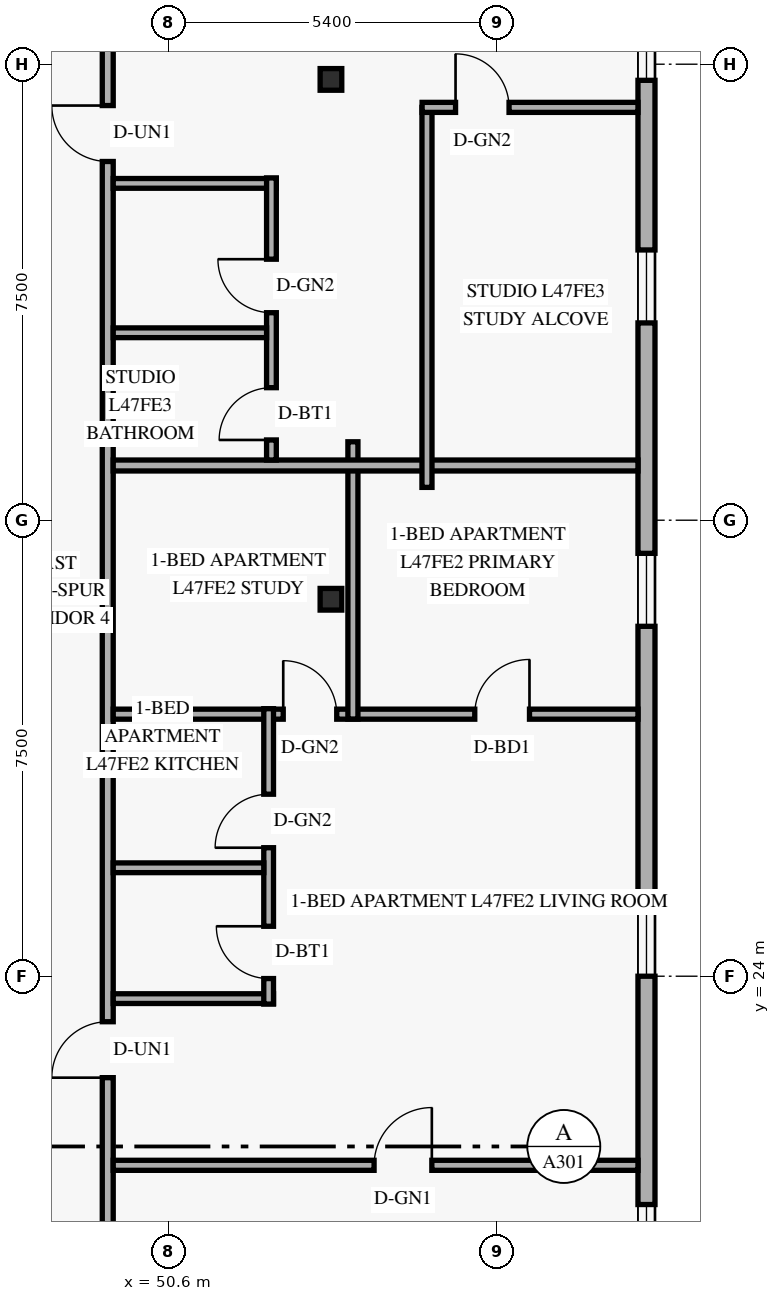
"""IFC4 building model, lengths in metres.
Left out: names, types, materials, properties, quantities, classifications, styles, units other than length and angle.
Written with IfcOpenShell. Run it as: python <this file> out.ifc"""

import sys

from ifc_helpers import new_model, si_unit, direction, frame, frame_2d, origin, origin_2d, place, context, subcontext, project, spatial, rectangle, hollow_rectangle, extrude, element, fill, save


model = new_model("IFC4")
c1 = context("Model", 3, precision=1e-05, world=origin(), true_north=direction((0.0, 1.0)))
c2 = subcontext(c1, "Body", "Model", "MODEL_VIEW")
j1 = project(units=[si_unit("LENGTHUNIT", "METRE"), si_unit("PLANEANGLEUNIT", "RADIAN")], contexts=[c1])
p1 = place(None, origin())
s1 = spatial("IfcSite", under=j1, at=p1, CompositionType="ELEMENT")
p2 = place(p1, origin())
s2 = spatial("IfcBuilding", under=s1, at=p2, CompositionType="ELEMENT")
p3 = place(p2, frame((0.0, 0.0, 181.2)))
s3 = spatial("IfcBuildingStorey", under=s2, at=p3, CompositionType="ELEMENT", Elevation=181.2)
for number, where, z_axis, x_axis in (
    (1, (53.167, 30.2, 0.0), (0.058, 0.0, 0.998), (0.0, 1.0, 0.0)),
    (2, (53.167, 38.75, 0.0), (0.058, 0.0, 0.998), (0.0, 1.0, 0.0)),
):
    element("IfcColumn", number, at=place(p3, frame(where, z_axis=z_axis, x_axis=x_axis)), inside=s3, PredefinedType="COLUMN", context=c2, shape_type="SweptSolid", body=[
        extrude(hollow_rectangle(XDim=0.356, YDim=0.356, WallThickness=0.016, at=origin_2d()), origin(), (0.0, 0.0, 1.0), 3.606),
    ])
p4 = place(p3, frame((58.46, 7.62, 0.0), z_axis=(0.0, 0.0, 1.0), x_axis=(0.0, 1.0, 0.0)))
e3 = element("IfcWall", 3, at=p4, inside=s3, PredefinedType="SOLIDWALL", context=c2, shape_type="SweptSolid", body=[
    extrude(rectangle(XDim=32.76, YDim=0.28, at=frame_2d((16.38, 0.0))), origin(), (0.0, 0.0, 1.0), 3.36),
])
p5 = place(p4, frame((4.79, 0.0, 0.85)))
e4 = element("IfcOpeningElement", 4, at=p5, cuts=e3, PredefinedType="OPENING", context=c2, shape_type="SweptSolid", body=[
    extrude(rectangle(XDim=1.2, YDim=1.5, at=frame_2d((0.6, 0.75))), frame((0.0, 0.15, 0.0), z_axis=(0.0, -1.0, 0.0), x_axis=(1.0, 0.0, 0.0)), (0.0, 0.0, 1.0), 0.3),
])
p6 = place(p4, frame((11.425, 0.0, 0.85)))
e5 = element("IfcOpeningElement", 5, at=p6, cuts=e3, PredefinedType="OPENING", context=c2, shape_type="SweptSolid", body=[
    extrude(rectangle(XDim=1.2, YDim=1.5, at=frame_2d((0.6, 0.75))), frame((0.0, 0.15, 0.0), z_axis=(0.0, -1.0, 0.0), x_axis=(1.0, 0.0, 0.0)), (0.0, 0.0, 1.0), 0.3),
])
p7 = place(p4, frame((16.38, 0.0, 0.85)))
e6 = element("IfcOpeningElement", 6, at=p7, cuts=e3, PredefinedType="OPENING", context=c2, shape_type="SweptSolid", body=[
    extrude(rectangle(XDim=1.2, YDim=1.5, at=frame_2d((0.6, 0.75))), frame((0.0, 0.15, 0.0), z_axis=(0.0, -1.0, 0.0), x_axis=(1.0, 0.0, 0.0)), (0.0, 0.0, 1.0), 0.3),
])
p8 = place(p4, frame((22.135, 0.0, 0.85)))
e7 = element("IfcOpeningElement", 7, at=p8, cuts=e3, PredefinedType="OPENING", context=c2, shape_type="SweptSolid", body=[
    extrude(rectangle(XDim=1.2, YDim=1.5, at=frame_2d((0.6, 0.75))), frame((0.0, 0.15, 0.0), z_axis=(0.0, -1.0, 0.0), x_axis=(1.0, 0.0, 0.0)), (0.0, 0.0, 1.0), 0.3),
])
p9 = place(p4, frame((27.125, 0.0, 0.85)))
e8 = element("IfcOpeningElement", 8, at=p9, cuts=e3, PredefinedType="OPENING", context=c2, shape_type="SweptSolid", body=[
    extrude(rectangle(XDim=1.2, YDim=1.5, at=frame_2d((0.6, 0.75))), frame((0.0, 0.15, 0.0), z_axis=(0.0, -1.0, 0.0), x_axis=(1.0, 0.0, 0.0)), (0.0, 0.0, 1.0), 0.3),
])
p10 = place(p4, frame((31.115, 0.0, 0.85)))
e9 = element("IfcOpeningElement", 9, at=p10, cuts=e3, PredefinedType="OPENING", context=c2, shape_type="SweptSolid", body=[
    extrude(rectangle(XDim=1.2, YDim=1.5, at=frame_2d((0.6, 0.75))), frame((0.0, 0.15, 0.0), z_axis=(0.0, -1.0, 0.0), x_axis=(1.0, 0.0, 0.0)), (0.0, 0.0, 1.0), 0.3),
])
p11 = place(p3, frame((49.6, 4.28, 0.0), z_axis=(0.0, 0.0, 1.0), x_axis=(0.0, 1.0, 0.0)))
e10 = element("IfcWall", 10, at=p11, inside=s3, PredefinedType="STANDARD", context=c2, shape_type="SweptSolid", body=[
    extrude(rectangle(XDim=39.44, YDim=0.18, at=frame_2d((19.72, 0.0))), origin(), (0.0, 0.0, 1.0), 2.73),
])
p12 = place(p11, frame((8.52, 0.0, 0.0)))
e11 = element("IfcOpeningElement", 11, at=p12, cuts=e10, PredefinedType="OPENING", context=c2, shape_type="SweptSolid", body=[
    extrude(rectangle(XDim=0.92, YDim=2.15, at=frame_2d((0.46, 1.075))), frame((0.0, 0.1, 0.0), z_axis=(0.0, -1.0, 0.0), x_axis=(1.0, 0.0, 0.0)), (0.0, 0.0, 1.0), 0.2),
])
p13 = place(p11, frame((18.052, 0.0, 0.0)))
e12 = element("IfcOpeningElement", 12, at=p13, cuts=e10, PredefinedType="OPENING", context=c2, shape_type="SweptSolid", body=[
    extrude(rectangle(XDim=0.92, YDim=2.15, at=frame_2d((0.46, 1.075))), frame((0.0, 0.1, 0.0), z_axis=(0.0, -1.0, 0.0), x_axis=(1.0, 0.0, 0.0)), (0.0, 0.0, 1.0), 0.2),
])
p14 = place(p11, frame((33.12, 0.0, 0.0)))
e13 = element("IfcOpeningElement", 13, at=p14, cuts=e10, PredefinedType="OPENING", context=c2, shape_type="SweptSolid", body=[
    extrude(rectangle(XDim=0.92, YDim=2.15, at=frame_2d((0.46, 1.075))), frame((0.0, 0.1, 0.0), z_axis=(0.0, -1.0, 0.0), x_axis=(1.0, 0.0, 0.0)), (0.0, 0.0, 1.0), 0.2),
])
p15 = place(p3, frame((49.69, 28.31, 0.0), z_axis=(0.0, 0.0, 1.0), x_axis=(1.0, 0.0, 0.0)))
e14 = element("IfcWall", 14, at=p15, inside=s3, PredefinedType="PARTITIONING", context=c2, shape_type="SweptSolid", body=[
    extrude(rectangle(XDim=8.63, YDim=0.165, at=frame_2d((4.315, 0.0))), origin(), (0.0, 0.0, 1.0), 2.879),
])
p16 = place(p15, frame((2.796, 0.0, 0.0)))
e15 = element("IfcOpeningElement", 15, at=p16, cuts=e14, PredefinedType="OPENING", context=c2, shape_type="SweptSolid", body=[
    extrude(rectangle(XDim=0.88, YDim=2.12, at=frame_2d((0.44, 1.06))), frame((0.0, 0.093, 0.0), z_axis=(0.0, -1.0, 0.0), x_axis=(1.0, 0.0, 0.0)), (0.0, 0.0, 1.0), 0.185),
])
p17 = place(p15, frame((5.946, 0.0, 0.0)))
e16 = element("IfcOpeningElement", 16, at=p17, cuts=e14, PredefinedType="OPENING", context=c2, shape_type="SweptSolid", body=[
    extrude(rectangle(XDim=0.9, YDim=2.14, at=frame_2d((0.45, 1.07))), frame((0.0, 0.093, 0.0), z_axis=(0.0, -1.0, 0.0), x_axis=(1.0, 0.0, 0.0)), (0.0, 0.0, 1.0), 0.185),
])
p18 = place(p3, frame((49.69, 23.632, 0.0), z_axis=(0.0, 0.0, 1.0), x_axis=(1.0, 0.0, 0.0)))
e17 = element("IfcWall", 17, at=p18, inside=s3, PredefinedType="PLUMBINGWALL", context=c2, shape_type="SweptSolid", body=[
    extrude(rectangle(XDim=2.636, YDim=0.16, at=frame_2d((1.318, 0.0))), origin(), (0.0, 0.0, 1.0), 3.36),
])
p19 = place(p3, frame((52.246, 23.542, 0.0), z_axis=(0.0, 0.0, 1.0), x_axis=(0.0, 1.0, 0.0)))
e18 = element("IfcWall", 18, at=p19, inside=s3, PredefinedType="PLUMBINGWALL", context=c2, shape_type="SweptSolid", body=[
    extrude(rectangle(XDim=4.858, YDim=0.16, at=frame_2d((2.429, 0.0))), origin(), (0.0, 0.0, 1.0), 3.36),
])
p20 = place(p19, frame((0.42, 0.0, 0.0)))
e19 = element("IfcOpeningElement", 19, at=p20, cuts=e18, PredefinedType="OPENING", context=c2, shape_type="SweptSolid", body=[
    extrude(rectangle(XDim=0.86, YDim=2.12, at=frame_2d((0.43, 1.06))), frame((0.0, 0.09, 0.0), z_axis=(0.0, -1.0, 0.0), x_axis=(1.0, 0.0, 0.0)), (0.0, 0.0, 1.0), 0.18),
])
p21 = place(p19, frame((2.572, 0.0, 0.0)))
e20 = element("IfcOpeningElement", 20, at=p21, cuts=e18, PredefinedType="OPENING", context=c2, shape_type="SweptSolid", body=[
    extrude(rectangle(XDim=0.88, YDim=2.12, at=frame_2d((0.44, 1.06))), frame((0.0, 0.09, 0.0), z_axis=(0.0, -1.0, 0.0), x_axis=(1.0, 0.0, 0.0)), (0.0, 0.0, 1.0), 0.18),
])
p22 = place(p3, frame((49.69, 25.784, 0.0), z_axis=(0.0, 0.0, 1.0), x_axis=(1.0, 0.0, 0.0)))
e21 = element("IfcWall", 21, at=p22, inside=s3, PredefinedType="PLUMBINGWALL", context=c2, shape_type="SweptSolid", body=[
    extrude(rectangle(XDim=2.476, YDim=0.16, at=frame_2d((1.238, 0.0))), origin(), (0.0, 0.0, 1.0), 3.36),
])
p23 = place(p3, frame((49.69, 20.89, 0.0), z_axis=(0.0, 0.0, 1.0), x_axis=(1.0, 0.0, 0.0)))
e22 = element("IfcWall", 22, at=p23, inside=s3, PredefinedType="PARTITIONING", context=c2, shape_type="SweptSolid", body=[
    extrude(rectangle(XDim=8.63, YDim=0.165, at=frame_2d((4.315, 0.0))), origin(), (0.0, 0.0, 1.0), 2.879),
])
p24 = place(p23, frame((4.29, 0.0, 0.0)))
e23 = element("IfcOpeningElement", 23, at=p24, cuts=e22, PredefinedType="OPENING", context=c2, shape_type="SweptSolid", body=[
    extrude(rectangle(XDim=0.95, YDim=2.15, at=frame_2d((0.475, 1.075))), frame((0.0, 0.093, 0.0), z_axis=(0.0, -1.0, 0.0), x_axis=(1.0, 0.0, 0.0)), (0.0, 0.0, 1.0), 0.185),
])
p25 = place(p3, frame((53.632, 28.23, 0.0), z_axis=(0.0, 0.0, 1.0), x_axis=(0.0, 1.0, 0.0)))
e24 = element("IfcWall", 24, at=p25, inside=s3, PredefinedType="PARTITIONING", context=c2, shape_type="SweptSolid", body=[
    extrude(rectangle(XDim=4.56, YDim=0.165, at=frame_2d((2.28, 0.0))), origin(), (0.0, 0.0, 1.0), 3.36),
])
p26 = place(p3, frame((49.69, 32.4, 0.0), z_axis=(0.0, 0.0, 1.0), x_axis=(1.0, 0.0, 0.0)))
e25 = element("IfcWall", 25, at=p26, inside=s3, PredefinedType="PARTITIONING", context=c2, shape_type="SweptSolid", body=[
    extrude(rectangle(XDim=8.63, YDim=0.18, at=frame_2d((4.315, 0.0))), origin(), (0.0, 0.0, 1.0), 2.879),
])
p27 = place(p3, frame((49.69, 37.04, 0.0), z_axis=(0.0, 0.0, 1.0), x_axis=(1.0, 0.0, 0.0)))
e26 = element("IfcWall", 26, at=p27, inside=s3, PredefinedType="PLUMBINGWALL", context=c2, shape_type="SweptSolid", body=[
    extrude(rectangle(XDim=2.682, YDim=0.16, at=frame_2d((1.341, 0.0))), origin(), (0.0, 0.0, 1.0), 3.36),
])
p28 = place(p3, frame((52.292, 32.49, 0.0), z_axis=(0.0, 0.0, 1.0), x_axis=(0.0, 1.0, 0.0)))
e27 = element("IfcWall", 27, at=p28, inside=s3, PredefinedType="PLUMBINGWALL", context=c2, shape_type="SweptSolid", body=[
    extrude(rectangle(XDim=4.64, YDim=0.16, at=frame_2d((2.32, 0.0))), origin(), (0.0, 0.0, 1.0), 2.984),
])
p29 = place(p28, frame((0.33, 0.0, 0.0)))
e28 = element("IfcOpeningElement", 28, at=p29, cuts=e27, PredefinedType="OPENING", context=c2, shape_type="SweptSolid", body=[
    extrude(rectangle(XDim=0.86, YDim=2.12, at=frame_2d((0.43, 1.06))), frame((0.0, 0.09, 0.0), z_axis=(0.0, -1.0, 0.0), x_axis=(1.0, 0.0, 0.0)), (0.0, 0.0, 1.0), 0.18),
])
p30 = place(p28, frame((2.423, 0.0, 0.0)))
e29 = element("IfcOpeningElement", 29, at=p30, cuts=e27, PredefinedType="OPENING", context=c2, shape_type="SweptSolid", body=[
    extrude(rectangle(XDim=0.88, YDim=2.12, at=frame_2d((0.44, 1.06))), frame((0.0, 0.09, 0.0), z_axis=(0.0, -1.0, 0.0), x_axis=(1.0, 0.0, 0.0)), (0.0, 0.0, 1.0), 0.18),
])
p31 = place(p3, frame((49.69, 34.583, 0.0), z_axis=(0.0, 0.0, 1.0), x_axis=(1.0, 0.0, 0.0)))
e30 = element("IfcWall", 30, at=p31, inside=s3, PredefinedType="PLUMBINGWALL", context=c2, shape_type="SweptSolid", body=[
    extrude(rectangle(XDim=2.522, YDim=0.16, at=frame_2d((1.261, 0.0))), origin(), (0.0, 0.0, 1.0), 2.984),
])
p32 = place(p3, frame((54.85, 32.04, 0.0), z_axis=(0.0, 0.0, 1.0), x_axis=(0.0, 1.0, 0.0)))
e31 = element("IfcWall", 31, at=p32, inside=s3, PredefinedType="PARTITIONING", context=c2, shape_type="SweptSolid", body=[
    extrude(rectangle(XDim=6.25, YDim=0.165, at=frame_2d((3.125, 0.0))), origin(), (0.0, 0.0, 1.0), 3.36),
])
p33 = place(p3, frame((54.77, 38.29, 0.0), z_axis=(0.0, 0.0, 1.0), x_axis=(1.0, 0.0, 0.0)))
e32 = element("IfcWall", 32, at=p33, inside=s3, PredefinedType="PARTITIONING", context=c2, shape_type="SweptSolid", body=[
    extrude(rectangle(XDim=3.55, YDim=0.165, at=frame_2d((1.775, 0.0))), origin(), (0.0, 0.0, 1.0), 3.36),
])
p34 = place(p33, frame((0.55, 0.0, 0.0)))
e33 = element("IfcOpeningElement", 33, at=p34, cuts=e32, PredefinedType="OPENING", context=c2, shape_type="SweptSolid", body=[
    extrude(rectangle(XDim=0.88, YDim=2.12, at=frame_2d((0.44, 1.06))), frame((0.0, 0.093, 0.0), z_axis=(0.0, -1.0, 0.0), x_axis=(1.0, 0.0, 0.0)), (0.0, 0.0, 1.0), 0.185),
])
p35 = place(p6, origin())
e34 = element("IfcWindow", 34, at=p35, inside=s3, PartitioningType="SINGLE_PANEL", PredefinedType="WINDOW", context=c2, shape_type="SweptSolid", body=[
    extrude(rectangle(XDim=1.2, YDim=1.5, at=frame_2d((0.6, 0.75))), frame((0.0, 0.03, 0.0), z_axis=(0.0, -1.0, 0.0), x_axis=(1.0, 0.0, 0.0)), (0.0, 0.0, 1.0), 0.06),
])
fill(e5, e34)
p36 = place(p7, origin())
e35 = element("IfcWindow", 35, at=p36, inside=s3, PartitioningType="SINGLE_PANEL", PredefinedType="WINDOW", context=c2, shape_type="SweptSolid", body=[
    extrude(rectangle(XDim=1.2, YDim=1.5, at=frame_2d((0.6, 0.75))), frame((0.0, 0.03, 0.0), z_axis=(0.0, -1.0, 0.0), x_axis=(1.0, 0.0, 0.0)), (0.0, 0.0, 1.0), 0.06),
])
fill(e6, e35)
p37 = place(p8, origin())
e36 = element("IfcWindow", 36, at=p37, inside=s3, PartitioningType="SINGLE_PANEL", PredefinedType="WINDOW", context=c2, shape_type="SweptSolid", body=[
    extrude(rectangle(XDim=1.2, YDim=1.5, at=frame_2d((0.6, 0.75))), frame((0.0, 0.03, 0.0), z_axis=(0.0, -1.0, 0.0), x_axis=(1.0, 0.0, 0.0)), (0.0, 0.0, 1.0), 0.06),
])
fill(e7, e36)
p38 = place(p9, origin())
e37 = element("IfcWindow", 37, at=p38, inside=s3, PartitioningType="SINGLE_PANEL", PredefinedType="WINDOW", context=c2, shape_type="SweptSolid", body=[
    extrude(rectangle(XDim=1.2, YDim=1.5, at=frame_2d((0.6, 0.75))), frame((0.0, 0.03, 0.0), z_axis=(0.0, -1.0, 0.0), x_axis=(1.0, 0.0, 0.0)), (0.0, 0.0, 1.0), 0.06),
])
fill(e8, e37)
p39 = place(p10, origin())
e38 = element("IfcWindow", 38, at=p39, inside=s3, PartitioningType="SINGLE_PANEL", PredefinedType="WINDOW", context=c2, shape_type="SweptSolid", body=[
    extrude(rectangle(XDim=1.2, YDim=1.5, at=frame_2d((0.6, 0.75))), frame((0.0, 0.03, 0.0), z_axis=(0.0, -1.0, 0.0), x_axis=(1.0, 0.0, 0.0)), (0.0, 0.0, 1.0), 0.06),
])
fill(e9, e38)
p40 = place(p24, origin())
e39 = element("IfcDoor", 39, at=p40, inside=s3, OperationType="SINGLE_SWING_RIGHT", PredefinedType="DOOR", context=c2, shape_type="SweptSolid", body=[
    extrude(rectangle(XDim=0.95, YDim=2.15, at=frame_2d((0.475, 1.075))), frame((0.0, 0.025, 0.0), z_axis=(0.0, -1.0, 0.0), x_axis=(1.0, 0.0, 0.0)), (0.0, 0.0, 1.0), 0.05),
])
fill(e23, e39)
p41 = place(p13, origin())
e40 = element("IfcDoor", 40, at=p41, inside=s3, OperationType="SINGLE_SWING_LEFT", PredefinedType="DOOR", context=c2, shape_type="SweptSolid", body=[
    extrude(rectangle(XDim=0.92, YDim=2.15, at=frame_2d((0.46, 1.075))), frame((0.0, 0.025, 0.0), z_axis=(0.0, -1.0, 0.0), x_axis=(1.0, 0.0, 0.0)), (0.0, 0.0, 1.0), 0.05),
])
fill(e12, e40)
p42 = place(p20, origin())
e41 = element("IfcDoor", 41, at=p42, inside=s3, OperationType="SINGLE_SWING_RIGHT", PredefinedType="DOOR", context=c2, shape_type="SweptSolid", body=[
    extrude(rectangle(XDim=0.86, YDim=2.12, at=frame_2d((0.43, 1.06))), frame((0.0, 0.025, 0.0), z_axis=(0.0, -1.0, 0.0), x_axis=(1.0, 0.0, 0.0)), (0.0, 0.0, 1.0), 0.05),
])
fill(e19, e41)
p43 = place(p21, origin())
e42 = element("IfcDoor", 42, at=p43, inside=s3, OperationType="SINGLE_SWING_LEFT", PredefinedType="DOOR", context=c2, shape_type="SweptSolid", body=[
    extrude(rectangle(XDim=0.88, YDim=2.12, at=frame_2d((0.44, 1.06))), frame((0.0, 0.025, 0.0), z_axis=(0.0, -1.0, 0.0), x_axis=(1.0, 0.0, 0.0)), (0.0, 0.0, 1.0), 0.05),
])
fill(e20, e42)
p44 = place(p16, origin())
e43 = element("IfcDoor", 43, at=p44, inside=s3, OperationType="SINGLE_SWING_LEFT", PredefinedType="DOOR", context=c2, shape_type="SweptSolid", body=[
    extrude(rectangle(XDim=0.88, YDim=2.12, at=frame_2d((0.44, 1.06))), frame((0.0, 0.025, 0.0), z_axis=(0.0, -1.0, 0.0), x_axis=(1.0, 0.0, 0.0)), (0.0, 0.0, 1.0), 0.05),
])
fill(e15, e43)
p45 = place(p17, origin())
e44 = element("IfcDoor", 44, at=p45, inside=s3, OperationType="SINGLE_SWING_RIGHT", PredefinedType="DOOR", context=c2, shape_type="SweptSolid", body=[
    extrude(rectangle(XDim=0.9, YDim=2.14, at=frame_2d((0.45, 1.07))), frame((0.0, 0.025, 0.0), z_axis=(0.0, -1.0, 0.0), x_axis=(1.0, 0.0, 0.0)), (0.0, 0.0, 1.0), 0.05),
])
fill(e16, e44)
p46 = place(p34, origin())
e45 = element("IfcDoor", 45, at=p46, inside=s3, OperationType="SINGLE_SWING_LEFT", PredefinedType="DOOR", context=c2, shape_type="SweptSolid", body=[
    extrude(rectangle(XDim=0.88, YDim=2.12, at=frame_2d((0.44, 1.06))), frame((0.0, 0.025, 0.0), z_axis=(0.0, -1.0, 0.0), x_axis=(1.0, 0.0, 0.0)), (0.0, 0.0, 1.0), 0.05),
])
fill(e33, e45)
p47 = place(p14, origin())
e46 = element("IfcDoor", 46, at=p47, inside=s3, OperationType="SINGLE_SWING_RIGHT", PredefinedType="DOOR", context=c2, shape_type="SweptSolid", body=[
    extrude(rectangle(XDim=0.92, YDim=2.15, at=frame_2d((0.46, 1.075))), frame((0.0, 0.025, 0.0), z_axis=(0.0, -1.0, 0.0), x_axis=(1.0, 0.0, 0.0)), (0.0, 0.0, 1.0), 0.05),
])
fill(e13, e46)
p48 = place(p29, origin())
e47 = element("IfcDoor", 47, at=p48, inside=s3, OperationType="SINGLE_SWING_LEFT", PredefinedType="DOOR", context=c2, shape_type="SweptSolid", body=[
    extrude(rectangle(XDim=0.86, YDim=2.12, at=frame_2d((0.43, 1.06))), frame((0.0, 0.025, 0.0), z_axis=(0.0, -1.0, 0.0), x_axis=(1.0, 0.0, 0.0)), (0.0, 0.0, 1.0), 0.05),
])
fill(e28, e47)
p49 = place(p30, origin())
e48 = element("IfcDoor", 48, at=p49, inside=s3, OperationType="SINGLE_SWING_RIGHT", PredefinedType="DOOR", context=c2, shape_type="SweptSolid", body=[
    extrude(rectangle(XDim=0.88, YDim=2.12, at=frame_2d((0.44, 1.06))), frame((0.0, 0.025, 0.0), z_axis=(0.0, -1.0, 0.0), x_axis=(1.0, 0.0, 0.0)), (0.0, 0.0, 1.0), 0.05),
])
fill(e29, e48)
save(model, sys.argv[1])
